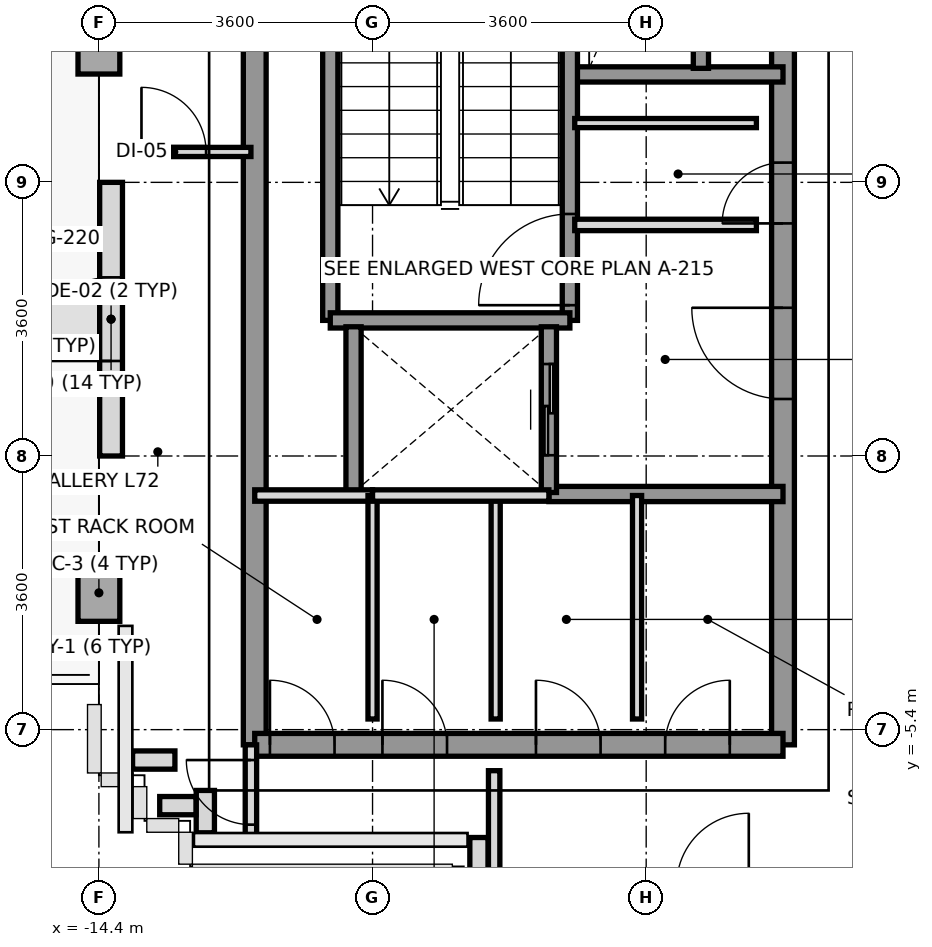
"""IFC4 building model, lengths in metres.
Left out: names, types, materials, properties, quantities, classifications, styles, units other than length and angle.
Written with IfcOpenShell. Run it as: python <this file> out.ifc"""

import sys

from ifc_helpers import new_model, si_unit, direction, frame, frame_2d, origin, origin_2d, place, context, subcontext, project, spatial, rectangle, extrude, source, transform, mapped, element, fill, save


model = new_model("IFC4")
c1 = context("Model", 3, precision=1e-05, world=origin(), true_north=direction((0.0, 1.0)))
c2 = subcontext(c1, "Body", "Model", "MODEL_VIEW")
j1 = project(units=[si_unit("LENGTHUNIT", "METRE"), si_unit("PLANEANGLEUNIT", "RADIAN")], contexts=[c1])
p1 = place(None, origin())
s1 = spatial("IfcSite", under=j1, at=p1, CompositionType="ELEMENT")
p2 = place(p1, origin())
s2 = spatial("IfcBuilding", under=s1, at=p2, CompositionType="ELEMENT")
p3 = place(p2, frame((0.0, 0.0, 258.8)))
s3 = spatial("IfcBuildingStorey", under=s2, at=p3, CompositionType="ELEMENT", Elevation=258.8)
m1 = source(origin(), c2, "Body", "SweptSolid", [
    extrude(rectangle(XDim=0.55, YDim=0.75, at=origin_2d()), origin(), (0.0, 0.0, 1.0), 3.01),
])
for number, where, z_axis, x_axis in (
    (1, (-14.4, -3.6, 0.0), (0.0, 0.0, 1.0), (1.0, 0.0, 0.0)),
    (2, (-14.4, 3.6, 0.0), (0.0, 0.0, 1.0), (1.0, 0.0, 0.0)),
):
    element("IfcColumn", number, at=place(p3, frame(where, z_axis=z_axis, x_axis=x_axis)), inside=s3, PredefinedType="COLUMN", context=c2, shape_type="MappedRepresentation", body=[
        mapped(m1, transform((0.0, 0.0, 0.0), x_axis=(1.0, 0.0, 0.0), y_axis=(0.0, 1.0, 0.0), z_axis=(0.0, 0.0, 1.0), scale=1.0)),
    ])
p4 = place(p3, frame((-14.24, -1.8, 0.0), z_axis=(0.0, 0.0, 1.0), x_axis=(0.0, 1.0, 0.0)))
e3 = element("IfcWall", 3, at=p4, inside=s3, PredefinedType="SOLIDWALL", context=c2, shape_type="SweptSolid", body=[
    extrude(rectangle(XDim=3.6, YDim=0.3, at=frame_2d((1.8, 0.0))), origin(), (0.0, 0.0, 1.0), 2.36),
])
p5 = place(p4, frame((1.25, 0.0, 0.0)))
e4 = element("IfcOpeningElement", 4, at=p5, cuts=e3, PredefinedType="OPENING", context=c2, shape_type="SweptSolid", body=[
    extrude(rectangle(XDim=1.1, YDim=2.3, at=frame_2d((0.55, 1.15))), frame((0.0, 0.16, 0.0), z_axis=(0.0, -1.0, 0.0), x_axis=(1.0, 0.0, 0.0)), (0.0, 0.0, 1.0), 0.32),
])
p6 = place(p3, frame((-9.4, -8.622, 0.0), z_axis=(0.0, 0.0, 1.0), x_axis=(0.0, 1.0, 0.0)))
e5 = element("IfcWall", 5, at=p6, inside=s3, PredefinedType="PARAPET", context=c2, shape_type="SweptSolid", body=[
    extrude(rectangle(XDim=1.803, YDim=0.24, at=frame_2d((0.901, 0.0))), origin(), (0.0, 0.0, 1.0), 1.15),
])
p7 = place(p3, frame((-13.0, -6.757, 0.0), z_axis=(0.0, 0.0, 1.0), x_axis=(0.0, 1.0, 0.0)))
e6 = element("IfcWall", 6, at=p7, inside=s3, PredefinedType="PARAPET", context=c2, shape_type="SweptSolid", body=[
    extrude(rectangle(XDim=0.557, YDim=0.24, at=frame_2d((0.279, 0.0))), origin(), (0.0, 0.0, 1.0), 1.15),
])
p8 = place(p3, frame((-13.123, -6.4, 0.0), z_axis=(0.0, 0.0, 1.0), x_axis=(-1.0, 0.0, 0.0)))
e7 = element("IfcWall", 7, at=p8, inside=s3, PredefinedType="PARAPET", context=c2, shape_type="SweptSolid", body=[
    extrude(rectangle(XDim=0.477, YDim=0.24, at=frame_2d((0.239, 0.0))), origin(), (0.0, 0.0, 1.0), 1.15),
])
p9 = place(p3, frame((-13.4, -5.8, 0.0), z_axis=(0.0, 0.0, 1.0), x_axis=(-1.0, 0.0, 0.0)))
e8 = element("IfcWall", 8, at=p9, inside=s3, PredefinedType="PARAPET", context=c2, shape_type="SweptSolid", body=[
    extrude(rectangle(XDim=0.557, YDim=0.24, at=frame_2d((0.279, 0.0))), origin(), (0.0, 0.0, 1.0), 1.15),
])
p10 = place(p3, frame((-12.35, -5.6, 0.0), z_axis=(0.0, 0.0, 1.0), x_axis=(0.0, 1.0, 0.0)))
e9 = element("IfcWall", 9, at=p10, inside=s3, PredefinedType="SHEAR", context=c2, shape_type="SweptSolid", body=[
    extrude(rectangle(XDim=12.5, YDim=0.3, at=frame_2d((6.25, 0.0))), origin(), (0.0, 0.0, 1.0), 3.01),
])
p11 = place(p3, frame((-5.4, -5.6, 0.0), z_axis=(0.0, 0.0, 1.0), x_axis=(0.0, 1.0, 0.0)))
e10 = element("IfcWall", 10, at=p11, inside=s3, PredefinedType="SHEAR", context=c2, shape_type="SweptSolid", body=[
    extrude(rectangle(XDim=12.5, YDim=0.3, at=frame_2d((6.25, 0.0))), origin(), (0.0, 0.0, 1.0), 3.01),
])
p12 = place(p11, frame((4.55, 0.0, 0.0)))
e11 = element("IfcOpeningElement", 11, at=p12, cuts=e10, PredefinedType="OPENING", context=c2, shape_type="SweptSolid", body=[
    extrude(rectangle(XDim=1.2, YDim=2.2, at=frame_2d((0.6, 1.1))), frame((0.0, 0.16, 0.0), z_axis=(0.0, -1.0, 0.0), x_axis=(1.0, 0.0, 0.0)), (0.0, 0.0, 1.0), 0.32),
])
p13 = place(p11, frame((10.45, 0.0, 0.0)))
e12 = element("IfcOpeningElement", 12, at=p13, cuts=e10, PredefinedType="OPENING", context=c2, shape_type="SweptSolid", body=[
    extrude(rectangle(XDim=1.2, YDim=2.2, at=frame_2d((0.6, 1.1))), frame((0.0, 0.16, 0.0), z_axis=(0.0, -1.0, 0.0), x_axis=(1.0, 0.0, 0.0)), (0.0, 0.0, 1.0), 0.32),
])
p14 = place(p11, frame((6.86, 0.0, 0.0)))
e13 = element("IfcOpeningElement", 13, at=p14, cuts=e10, PredefinedType="OPENING", context=c2, shape_type="SweptSolid", body=[
    extrude(rectangle(XDim=0.8, YDim=2.1, at=frame_2d((0.4, 1.05))), frame((0.0, 0.16, 0.0), z_axis=(0.0, -1.0, 0.0), x_axis=(1.0, 0.0, 0.0)), (0.0, 0.0, 1.0), 0.32),
])
p15 = place(p3, frame((-12.35, -5.6, 0.0), z_axis=(0.0, 0.0, 1.0), x_axis=(1.0, 0.0, 0.0)))
e14 = element("IfcWall", 14, at=p15, inside=s3, PredefinedType="SHEAR", context=c2, shape_type="SweptSolid", body=[
    extrude(rectangle(XDim=6.95, YDim=0.3, at=frame_2d((3.475, 0.0))), origin(), (0.0, 0.0, 1.0), 3.01),
])
p16 = place(p15, frame((0.2, 0.0, 0.0)))
e15 = element("IfcOpeningElement", 15, at=p16, cuts=e14, PredefinedType="OPENING", context=c2, shape_type="SweptSolid", body=[
    extrude(rectangle(XDim=0.85, YDim=2.1, at=frame_2d((0.425, 1.05))), frame((0.0, 0.16, 0.0), z_axis=(0.0, -1.0, 0.0), x_axis=(1.0, 0.0, 0.0)), (0.0, 0.0, 1.0), 0.32),
])
p17 = place(p15, frame((1.68, 0.0, 0.0)))
e16 = element("IfcOpeningElement", 16, at=p17, cuts=e14, PredefinedType="OPENING", context=c2, shape_type="SweptSolid", body=[
    extrude(rectangle(XDim=0.85, YDim=2.1, at=frame_2d((0.425, 1.05))), frame((0.0, 0.16, 0.0), z_axis=(0.0, -1.0, 0.0), x_axis=(1.0, 0.0, 0.0)), (0.0, 0.0, 1.0), 0.32),
])
p18 = place(p15, frame((3.7, 0.0, 0.0)))
e17 = element("IfcOpeningElement", 17, at=p18, cuts=e14, PredefinedType="OPENING", context=c2, shape_type="SweptSolid", body=[
    extrude(rectangle(XDim=0.85, YDim=2.1, at=frame_2d((0.425, 1.05))), frame((0.0, 0.16, 0.0), z_axis=(0.0, -1.0, 0.0), x_axis=(1.0, 0.0, 0.0)), (0.0, 0.0, 1.0), 0.32),
])
p19 = place(p15, frame((5.4, 0.0, 0.0)))
e18 = element("IfcOpeningElement", 18, at=p19, cuts=e14, PredefinedType="OPENING", context=c2, shape_type="SweptSolid", body=[
    extrude(rectangle(XDim=0.85, YDim=2.1, at=frame_2d((0.425, 1.05))), frame((0.0, 0.16, 0.0), z_axis=(0.0, -1.0, 0.0), x_axis=(1.0, 0.0, 0.0)), (0.0, 0.0, 1.0), 0.32),
])
p20 = place(p3, frame((-8.18, 3.22, 0.0), z_axis=(0.0, 0.0, 1.0), x_axis=(1.0, 0.0, 0.0)))
e19 = element("IfcWall", 19, at=p20, inside=s3, PredefinedType="SOLIDWALL", context=c2, shape_type="SweptSolid", body=[
    extrude(rectangle(XDim=2.78, YDim=0.2, at=frame_2d((1.39, 0.0))), origin(), (0.0, 0.0, 1.0), 3.01),
])
p21 = place(p3, frame((-8.48, -2.3, 0.0), z_axis=(0.0, 0.0, 1.0), x_axis=(1.0, 0.0, 0.0)))
e20 = element("IfcWall", 20, at=p21, inside=s3, PredefinedType="SOLIDWALL", context=c2, shape_type="SweptSolid", body=[
    extrude(rectangle(XDim=3.08, YDim=0.2, at=frame_2d((1.54, 0.0))), origin(), (0.0, 0.0, 1.0), 3.01),
])
p22 = place(p3, frame((-8.204, -0.016, 0.0), z_axis=(0.0, 0.0, 1.0), x_axis=(0.0, 1.0, 0.0)))
e21 = element("IfcWall", 21, at=p22, inside=s3, PredefinedType="SOLIDWALL", context=c2, shape_type="SweptSolid", body=[
    extrude(rectangle(XDim=6.916, YDim=0.2, at=frame_2d((3.458, 0.0))), origin(), (0.0, 0.0, 1.0), 3.01),
])
p23 = place(p22, frame((0.2, 0.0, 0.0)))
e22 = element("IfcOpeningElement", 22, at=p23, cuts=e21, PredefinedType="OPENING", context=c2, shape_type="SweptSolid", body=[
    extrude(rectangle(XDim=1.2, YDim=2.2, at=frame_2d((0.6, 1.1))), frame((0.0, 0.11, 0.0), z_axis=(0.0, -1.0, 0.0), x_axis=(1.0, 0.0, 0.0)), (0.0, 0.0, 1.0), 0.22),
])
p24 = place(p3, frame((-11.356, -0.016, 0.0), z_axis=(0.0, 0.0, 1.0), x_axis=(0.0, 1.0, 0.0)))
e23 = element("IfcWall", 23, at=p24, inside=s3, PredefinedType="SOLIDWALL", context=c2, shape_type="SweptSolid", body=[
    extrude(rectangle(XDim=6.916, YDim=0.2, at=frame_2d((3.458, 0.0))), origin(), (0.0, 0.0, 1.0), 3.01),
])
p25 = place(p3, frame((-11.356, -0.016, 0.0), z_axis=(0.0, 0.0, 1.0), x_axis=(1.0, 0.0, 0.0)))
e24 = element("IfcWall", 24, at=p25, inside=s3, PredefinedType="SOLIDWALL", context=c2, shape_type="SweptSolid", body=[
    extrude(rectangle(XDim=3.152, YDim=0.2, at=frame_2d((1.576, 0.0))), origin(), (0.0, 0.0, 1.0), 3.01),
])
p26 = place(p3, frame((-11.05, -2.28, 0.0), z_axis=(0.0, 0.0, 1.0), x_axis=(0.0, 1.0, 0.0)))
e25 = element("IfcWall", 25, at=p26, inside=s3, PredefinedType="SOLIDWALL", context=c2, shape_type="SweptSolid", body=[
    extrude(rectangle(XDim=2.18, YDim=0.2, at=frame_2d((1.09, 0.0))), origin(), (0.0, 0.0, 1.0), 3.01),
])
p27 = place(p3, frame((-8.48, -2.28, 0.0), z_axis=(0.0, 0.0, 1.0), x_axis=(0.0, 1.0, 0.0)))
e26 = element("IfcWall", 26, at=p27, inside=s3, PredefinedType="SOLIDWALL", context=c2, shape_type="SweptSolid", body=[
    extrude(rectangle(XDim=2.18, YDim=0.2, at=frame_2d((1.09, 0.0))), origin(), (0.0, 0.0, 1.0), 3.01),
])
p28 = place(p27, frame((0.49, 0.0, 0.0)))
e27 = element("IfcOpeningElement", 27, at=p28, cuts=e26, PredefinedType="OPENING", context=c2, shape_type="SweptSolid", body=[
    extrude(rectangle(XDim=1.2, YDim=2.2, at=frame_2d((0.6, 1.1))), frame((0.0, 0.11, 0.0), z_axis=(0.0, -1.0, 0.0), x_axis=(1.0, 0.0, 0.0)), (0.0, 0.0, 1.0), 0.22),
])
p29 = place(p3, frame((-6.48, 3.3, 0.0), z_axis=(0.0, 0.0, 1.0), x_axis=(0.0, 1.0, 0.0)))
e28 = element("IfcWall", 28, at=p29, inside=s3, PredefinedType="SOLIDWALL", context=c2, shape_type="SweptSolid", body=[
    extrude(rectangle(XDim=1.68, YDim=0.2, at=frame_2d((0.84, 0.0))), origin(), (0.0, 0.0, 1.0), 3.01),
])
p30 = place(p29, frame((0.29, 0.0, 0.0)))
e29 = element("IfcOpeningElement", 29, at=p30, cuts=e28, PredefinedType="OPENING", context=c2, shape_type="SweptSolid", body=[
    extrude(rectangle(XDim=1.1, YDim=2.2, at=frame_2d((0.55, 1.1))), frame((0.0, 0.11, 0.0), z_axis=(0.0, -1.0, 0.0), x_axis=(1.0, 0.0, 0.0)), (0.0, 0.0, 1.0), 0.22),
])
p31 = place(p3, frame((-8.14, 1.24, 0.0), z_axis=(0.0, 0.0, 1.0), x_axis=(1.0, 0.0, 0.0)))
e30 = element("IfcWall", 30, at=p31, inside=s3, PredefinedType="PARTITIONING", context=c2, shape_type="SweptSolid", body=[
    extrude(rectangle(XDim=2.39, YDim=0.15, at=frame_2d((1.195, 0.0))), origin(), (0.0, 0.0, 1.0), 3.01),
])
p32 = place(p3, frame((-8.14, 2.58, 0.0), z_axis=(0.0, 0.0, 1.0), x_axis=(1.0, 0.0, 0.0)))
e31 = element("IfcWall", 31, at=p32, inside=s3, PredefinedType="PARTITIONING", context=c2, shape_type="SweptSolid", body=[
    extrude(rectangle(XDim=2.39, YDim=0.12, at=frame_2d((1.195, 0.0))), origin(), (0.0, 0.0, 1.0), 3.01),
])
p33 = place(p3, frame((-12.35, -2.32, 0.0), z_axis=(0.0, 0.0, 1.0), x_axis=(1.0, 0.0, 0.0)))
e32 = element("IfcWall", 32, at=p33, inside=s3, PredefinedType="PARTITIONING", context=c2, shape_type="SweptSolid", body=[
    extrude(rectangle(XDim=1.55, YDim=0.15, at=frame_2d((0.775, 0.0))), origin(), (0.0, 0.0, 1.0), 3.01),
])
for number, where, z_axis, x_axis in (
    (33, (-10.8, -5.26, 0.0), (0.0, 0.0, 1.0), (0.0, 1.0, 0.0)),
    (34, (-9.18, -5.26, 0.0), (0.0, 0.0, 1.0), (0.0, 1.0, 0.0)),
    (35, (-7.32, -5.26, 0.0), (0.0, 0.0, 1.0), (0.0, 1.0, 0.0)),
):
    element("IfcWall", number, at=place(p3, frame(where, z_axis=z_axis, x_axis=x_axis)), inside=s3, PredefinedType="PARTITIONING", context=c2, shape_type="SweptSolid", body=[
        extrude(rectangle(XDim=2.94, YDim=0.12, at=frame_2d((1.47, 0.0))), origin(), (0.0, 0.0, 1.0), 3.01),
    ])
p34 = place(p3, frame((-10.8, -2.32, 0.0), z_axis=(0.0, 0.0, 1.0), x_axis=(1.0, 0.0, 0.0)))
e36 = element("IfcWall", 36, at=p34, inside=s3, PredefinedType="PARTITIONING", context=c2, shape_type="SweptSolid", body=[
    extrude(rectangle(XDim=2.32, YDim=0.15, at=frame_2d((1.16, 0.0))), origin(), (0.0, 0.0, 1.0), 3.01),
])
p35 = place(p3, frame((-9.2, -10.28, 0.0), z_axis=(0.0, 0.0, 1.0), x_axis=(0.0, 1.0, 0.0)))
e37 = element("IfcWall", 37, at=p35, inside=s3, PredefinedType="PARTITIONING", context=c2, shape_type="SweptSolid", body=[
    extrude(rectangle(XDim=4.34, YDim=0.15, at=frame_2d((2.17, 0.0))), origin(), (0.0, 0.0, 1.0), 2.61),
])
p36 = place(p3, frame((-12.4, -6.85, 0.0), z_axis=(0.0, 0.0, 1.0), x_axis=(0.0, 1.0, 0.0)))
e38 = element("IfcWall", 38, at=p36, inside=s3, PredefinedType="PARTITIONING", context=c2, shape_type="SweptSolid", body=[
    extrude(rectangle(XDim=1.25, YDim=0.15, at=frame_2d((0.625, 0.0))), origin(), (0.0, 0.0, 1.0), 3.01),
])
p37 = place(p36, frame((0.2, 0.0, 0.0)))
e39 = element("IfcOpeningElement", 39, at=p37, cuts=e38, PredefinedType="OPENING", context=c2, shape_type="SweptSolid", body=[
    extrude(rectangle(XDim=0.85, YDim=2.1, at=frame_2d((0.425, 1.05))), frame((0.0, 0.085, 0.0), z_axis=(0.0, -1.0, 0.0), x_axis=(1.0, 0.0, 0.0)), (0.0, 0.0, 1.0), 0.17),
])
p38 = place(p3, frame((-14.04, 2.2, 0.0), z_axis=(0.0, 0.0, 1.0), x_axis=(1.0, 0.0, 0.0)))
e40 = element("IfcWall", 40, at=p38, inside=s3, PredefinedType="PARTITIONING", context=c2, shape_type="SweptSolid", body=[
    extrude(rectangle(XDim=1.64, YDim=0.12, at=frame_2d((0.82, 0.0))), origin(), (0.0, 0.0, 1.0), 3.01),
])
p39 = place(p38, frame((0.2, 0.0, 0.0)))
e41 = element("IfcOpeningElement", 41, at=p39, cuts=e40, PredefinedType="OPENING", context=c2, shape_type="SweptSolid", body=[
    extrude(rectangle(XDim=0.85, YDim=2.1, at=frame_2d((0.425, 1.05))), frame((0.0, 0.07, 0.0), z_axis=(0.0, -1.0, 0.0), x_axis=(1.0, 0.0, 0.0)), (0.0, 0.0, 1.0), 0.14),
])
m2 = source(origin(), c2, "Body", "SweptSolid", [
    extrude(rectangle(XDim=1.1, YDim=2.3, at=frame_2d((0.55, 1.15))), frame((0.0, 0.025, 0.0), z_axis=(0.0, -1.0, 0.0), x_axis=(1.0, 0.0, 0.0)), (0.0, 0.0, 1.0), 0.05),
])
p40 = place(p5, origin())
e42 = element("IfcDoor", 42, at=p40, inside=s3, OperationType="SINGLE_SWING_LEFT", PredefinedType="DOOR", context=c2, shape_type="MappedRepresentation", body=[
    mapped(m2, transform((0.0, 0.0, 0.0), x_axis=(1.0, 0.0, 0.0), y_axis=(0.0, 1.0, 0.0), z_axis=(0.0, 0.0, 1.0), scale=1.0)),
])
fill(e4, e42)
m3 = source(origin(), c2, "Body", "SweptSolid", [
    extrude(rectangle(XDim=1.2, YDim=2.2, at=frame_2d((0.6, 1.1))), frame((0.0, 0.025, 0.0), z_axis=(0.0, -1.0, 0.0), x_axis=(1.0, 0.0, 0.0)), (0.0, 0.0, 1.0), 0.05),
])
p41 = place(p23, origin())
e43 = element("IfcDoor", 43, at=p41, inside=s3, OperationType="SINGLE_SWING_LEFT", PredefinedType="DOOR", context=c2, shape_type="MappedRepresentation", body=[
    mapped(m3, transform((0.0, 0.0, 0.0), x_axis=(1.0, 0.0, 0.0), y_axis=(0.0, 1.0, 0.0), z_axis=(0.0, 0.0, 1.0), scale=1.0)),
])
fill(e22, e43)
p42 = place(p12, origin())
e44 = element("IfcDoor", 44, at=p42, inside=s3, OperationType="SINGLE_SWING_RIGHT", PredefinedType="DOOR", context=c2, shape_type="MappedRepresentation", body=[
    mapped(m3, transform((0.0, 0.0, 0.0), x_axis=(1.0, 0.0, 0.0), y_axis=(0.0, 1.0, 0.0), z_axis=(0.0, 0.0, 1.0), scale=1.0)),
])
fill(e11, e44)
m4 = source(origin(), c2, "Body", "SweptSolid", [
    extrude(rectangle(XDim=0.8, YDim=2.1, at=frame_2d((0.4, 1.05))), frame((0.0, 0.025, 0.0), z_axis=(0.0, -1.0, 0.0), x_axis=(1.0, 0.0, 0.0)), (0.0, 0.0, 1.0), 0.05),
])
p43 = place(p14, origin())
e45 = element("IfcDoor", 45, at=p43, inside=s3, OperationType="SINGLE_SWING_LEFT", PredefinedType="DOOR", context=c2, shape_type="MappedRepresentation", body=[
    mapped(m4, transform((0.0, 0.0, 0.0), x_axis=(1.0, 0.0, 0.0), y_axis=(0.0, 1.0, 0.0), z_axis=(0.0, 0.0, 1.0), scale=1.0)),
])
fill(e13, e45)
m5 = source(origin(), c2, "Body", "SweptSolid", [
    extrude(rectangle(XDim=0.85, YDim=2.1, at=frame_2d((0.425, 1.05))), frame((0.0, 0.025, 0.0), z_axis=(0.0, -1.0, 0.0), x_axis=(1.0, 0.0, 0.0)), (0.0, 0.0, 1.0), 0.05),
])
p44 = place(p16, origin())
e46 = element("IfcDoor", 46, at=p44, inside=s3, OperationType="SINGLE_SWING_LEFT", PredefinedType="DOOR", context=c2, shape_type="MappedRepresentation", body=[
    mapped(m5, transform((0.0, 0.0, 0.0), x_axis=(1.0, 0.0, 0.0), y_axis=(0.0, 1.0, 0.0), z_axis=(0.0, 0.0, 1.0), scale=1.0)),
])
fill(e15, e46)
p45 = place(p17, origin())
e47 = element("IfcDoor", 47, at=p45, inside=s3, OperationType="SINGLE_SWING_LEFT", PredefinedType="DOOR", context=c2, shape_type="MappedRepresentation", body=[
    mapped(m5, transform((0.0, 0.0, 0.0), x_axis=(1.0, 0.0, 0.0), y_axis=(0.0, 1.0, 0.0), z_axis=(0.0, 0.0, 1.0), scale=1.0)),
])
fill(e16, e47)
p46 = place(p18, origin())
e48 = element("IfcDoor", 48, at=p46, inside=s3, OperationType="SINGLE_SWING_LEFT", PredefinedType="DOOR", context=c2, shape_type="MappedRepresentation", body=[
    mapped(m5, transform((0.0, 0.0, 0.0), x_axis=(1.0, 0.0, 0.0), y_axis=(0.0, 1.0, 0.0), z_axis=(0.0, 0.0, 1.0), scale=1.0)),
])
fill(e17, e48)
p47 = place(p19, origin())
e49 = element("IfcDoor", 49, at=p47, inside=s3, OperationType="SINGLE_SWING_RIGHT", PredefinedType="DOOR", context=c2, shape_type="MappedRepresentation", body=[
    mapped(m5, transform((0.0, 0.0, 0.0), x_axis=(1.0, 0.0, 0.0), y_axis=(0.0, 1.0, 0.0), z_axis=(0.0, 0.0, 1.0), scale=1.0)),
])
fill(e18, e49)
p48 = place(p28, origin())
e50 = element("IfcDoor", 50, at=p48, inside=s3, OperationType="SLIDING_TO_RIGHT", PredefinedType="DOOR", context=c2, shape_type="MappedRepresentation", body=[
    mapped(m3, transform((0.0, 0.0, 0.0), x_axis=(1.0, 0.0, 0.0), y_axis=(0.0, 1.0, 0.0), z_axis=(0.0, 0.0, 1.0), scale=1.0)),
])
fill(e27, e50)
p49 = place(p37, origin())
e51 = element("IfcDoor", 51, at=p49, inside=s3, OperationType="SINGLE_SWING_RIGHT", PredefinedType="DOOR", context=c2, shape_type="MappedRepresentation", body=[
    mapped(m5, transform((0.0, 0.0, 0.0), x_axis=(1.0, 0.0, 0.0), y_axis=(0.0, 1.0, 0.0), z_axis=(0.0, 0.0, 1.0), scale=1.0)),
])
fill(e39, e51)
p50 = place(p39, origin())
e52 = element("IfcDoor", 52, at=p50, inside=s3, OperationType="SINGLE_SWING_LEFT", PredefinedType="DOOR", context=c2, shape_type="MappedRepresentation", body=[
    mapped(m5, transform((0.0, 0.0, 0.0), x_axis=(1.0, 0.0, 0.0), y_axis=(0.0, 1.0, 0.0), z_axis=(0.0, 0.0, 1.0), scale=1.0)),
])
fill(e41, e52)
save(model, sys.argv[1])
